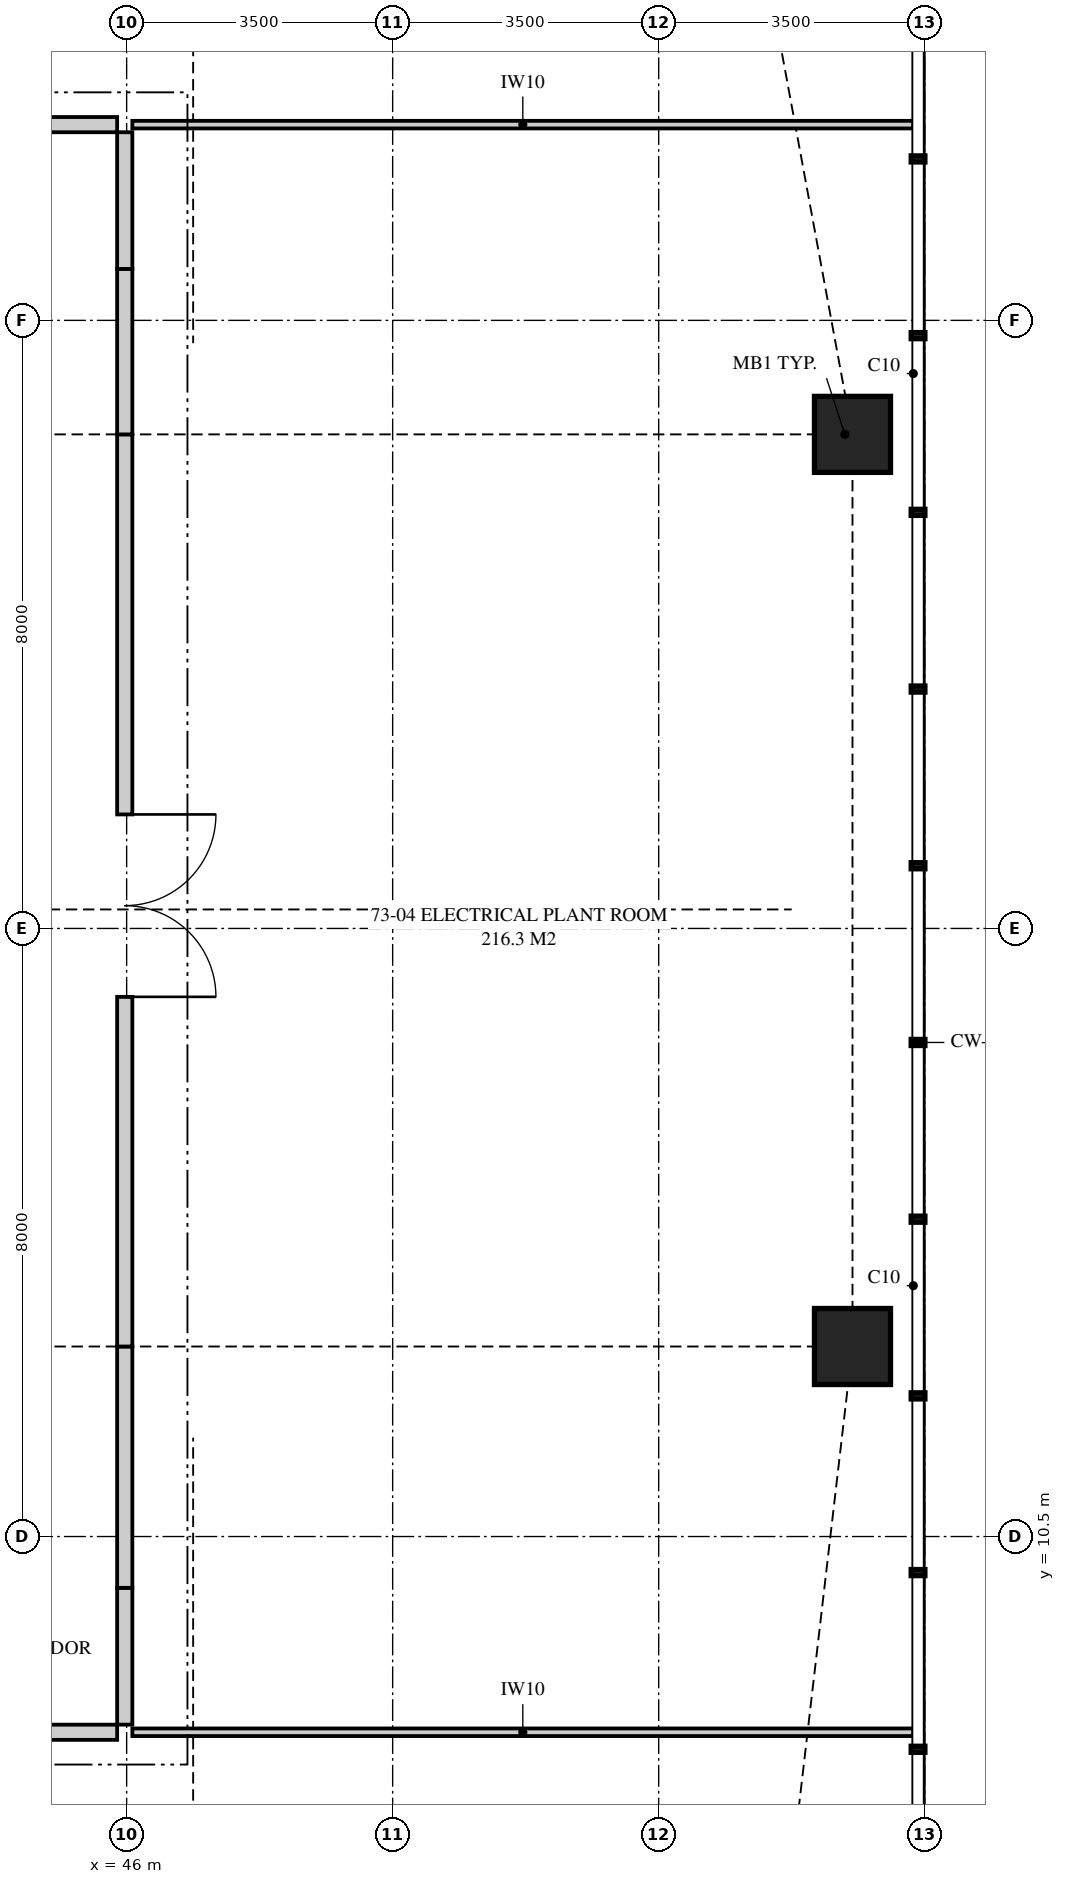
"""IFC4 building model, lengths in metres.
Left out: names, types, materials, properties, quantities, classifications, styles, units other than length and angle.
Written with IfcOpenShell. Run it as: python <this file> out.ifc"""

import sys

from ifc_helpers import new_model, si_unit, direction, frame, frame_2d, origin, origin_2d, place, context, subcontext, project, spatial, polyline, rectangle, outline, extrude, element, fill, save


model = new_model("IFC4")
c1 = context("Model", 3, precision=1e-05, world=origin(), true_north=direction((0.0, 1.0)))
c2 = subcontext(c1, "Body", "Model", "MODEL_VIEW")
j1 = project(units=[si_unit("LENGTHUNIT", "METRE"), si_unit("PLANEANGLEUNIT", "RADIAN")], contexts=[c1])
p1 = place(None, origin())
s1 = spatial("IfcSite", under=j1, at=p1, CompositionType="ELEMENT")
p2 = place(p1, origin())
s2 = spatial("IfcBuilding", under=s1, at=p2, CompositionType="ELEMENT")
p3 = place(p2, frame((0.0, 0.0, 267.75)))
s3 = spatial("IfcBuildingStorey", under=s2, at=p3, CompositionType="ELEMENT", Elevation=267.75)
for number, where, z_axis, x_axis in (
    (1, (55.55, 13.0, 0.0), (0.0, 0.0, 1.0), (1.0, 0.0, 0.0)),
    (2, (55.55, 25.0, 0.0), (0.0, 0.0, 1.0), (1.0, 0.0, 0.0)),
):
    element("IfcColumn", number, at=place(p3, frame(where, z_axis=z_axis, x_axis=x_axis)), inside=s3, PredefinedType="COLUMN", context=c2, shape_type="SweptSolid", body=[
        extrude(rectangle(XDim=1.0, YDim=1.0, at=origin_2d()), origin(), (0.0, 0.0, 1.0), 5.0),
    ])
p4 = place(p3, frame((17.825, 7.925, 0.0), z_axis=(0.0, 0.0, 1.0), x_axis=(1.0, 0.0, 0.0)))
e3 = element("IfcWall", 3, at=p4, inside=s3, PredefinedType="PARTITIONING", context=c2, shape_type="SweptSolid", body=[
    extrude(outline(polyline([(0.0, 0.0), (28.05, 0.0), (28.05, 4.72), (28.05, 4.12), (27.74, 4.12), (27.74, 4.72), (20.735, 4.72), (20.735, 4.12), (18.115, 4.12), (18.115, 4.72), (11.11, 4.72), (11.11, 4.12), (8.49, 4.12), (8.49, 4.72), (3.692, 4.72), (3.692, 4.12), (2.014, 4.12), (2.014, 3.5), (0.147, 3.5), (0.147, 4.72), (0.0, 4.72), (0.0, 0.0)])), frame((0.0, 0.1, 0.0), z_axis=(0.0, -1.0, 0.0), x_axis=(1.0, 0.0, 0.0)), (0.0, 0.0, 1.0), 0.2),
])
p5 = place(p4, frame((13.175, 0.0, 0.0)))
e4 = element("IfcOpeningElement", 4, at=p5, cuts=e3, PredefinedType="OPENING", context=c2, shape_type="SweptSolid", body=[
    extrude(rectangle(XDim=2.4, YDim=2.4, at=frame_2d((1.2, 1.2))), frame((0.0, 0.11, 0.0), z_axis=(0.0, -1.0, 0.0), x_axis=(1.0, 0.0, 0.0)), (0.0, 0.0, 1.0), 0.22),
])
p6 = place(p3, frame((45.975, 8.025, 0.0), z_axis=(0.0, 0.0, 1.0), x_axis=(0.0, 1.0, 0.0)))
e5 = element("IfcWall", 5, at=p6, inside=s3, PredefinedType="PARTITIONING", context=c2, shape_type="SweptSolid", body=[
    extrude(outline(polyline([(0.0, 0.0), (1.8, 0.0), (1.8, 4.72), (1.8, 4.12), (0.0, 4.12), (0.0, 4.72), (0.0, 0.0)])), frame((0.0, 0.1, 0.0), z_axis=(0.0, -1.0, 0.0), x_axis=(1.0, 0.0, 0.0)), (0.0, 0.0, 1.0), 0.2),
])
p7 = place(p3, frame((17.825, 29.075, 0.0), z_axis=(0.0, 0.0, 1.0), x_axis=(1.0, 0.0, 0.0)))
e6 = element("IfcWall", 6, at=p7, inside=s3, PredefinedType="PARTITIONING", context=c2, shape_type="SweptSolid", body=[
    extrude(outline(polyline([(0.0, 0.0), (28.05, 0.0), (28.05, 4.72), (28.05, 4.12), (27.74, 4.12), (27.74, 4.72), (20.735, 4.72), (20.735, 4.12), (18.115, 4.12), (18.115, 4.72), (11.11, 4.72), (11.11, 4.12), (8.49, 4.12), (8.49, 4.72), (3.692, 4.72), (3.692, 4.12), (2.367, 4.12), (2.367, 3.5), (0.431, 3.5), (0.431, 4.72), (0.0, 4.72), (0.0, 0.0)])), frame((0.0, 0.1, 0.0), z_axis=(0.0, -1.0, 0.0), x_axis=(1.0, 0.0, 0.0)), (0.0, 0.0, 1.0), 0.2),
])
p8 = place(p7, frame((13.175, 0.0, 0.0)))
e7 = element("IfcOpeningElement", 7, at=p8, cuts=e6, PredefinedType="OPENING", context=c2, shape_type="SweptSolid", body=[
    extrude(rectangle(XDim=2.4, YDim=2.4, at=frame_2d((1.2, 1.2))), frame((0.0, 0.11, 0.0), z_axis=(0.0, -1.0, 0.0), x_axis=(1.0, 0.0, 0.0)), (0.0, 0.0, 1.0), 0.22),
])
p9 = place(p3, frame((45.975, 27.175, 0.0), z_axis=(0.0, 0.0, 1.0), x_axis=(0.0, 1.0, 0.0)))
e8 = element("IfcWall", 8, at=p9, inside=s3, PredefinedType="PARTITIONING", context=c2, shape_type="SweptSolid", body=[
    extrude(outline(polyline([(0.0, 0.0), (1.8, 0.0), (1.8, 4.72), (1.8, 4.12), (0.0, 4.12), (0.0, 4.72), (0.0, 0.0)])), frame((0.0, 0.1, 0.0), z_axis=(0.0, -1.0, 0.0), x_axis=(1.0, 0.0, 0.0)), (0.0, 0.0, 1.0), 0.2),
])
p10 = place(p3, frame((45.975, 9.825, 0.0), z_axis=(0.0, 0.0, 1.0), x_axis=(0.0, 1.0, 0.0)))
e9 = element("IfcWall", 9, at=p10, inside=s3, PredefinedType="PARTITIONING", context=c2, shape_type="SweptSolid", body=[
    extrude(rectangle(XDim=3.175, YDim=0.2, at=frame_2d((1.587, 0.0))), origin(), (0.0, 0.0, 1.0), 4.12),
])
p11 = place(p3, frame((45.975, 13.0, 0.0), z_axis=(0.0, 0.0, 1.0), x_axis=(0.0, 1.0, 0.0)))
e10 = element("IfcWall", 10, at=p11, inside=s3, PredefinedType="PARTITIONING", context=c2, shape_type="SweptSolid", body=[
    extrude(outline(polyline([(0.0, 0.0), (12.0, 0.0), (12.0, 4.12), (10.69, 4.12), (10.69, 4.72), (7.06, 4.72), (7.06, 4.12), (4.44, 4.12), (4.44, 4.72), (1.31, 4.72), (1.31, 4.12), (0.0, 4.12), (0.0, 0.0)])), frame((0.0, 0.1, 0.0), z_axis=(0.0, -1.0, 0.0), x_axis=(1.0, 0.0, 0.0)), (0.0, 0.0, 1.0), 0.2),
])
p12 = place(p11, frame((4.6, 0.0, 0.0)))
e11 = element("IfcOpeningElement", 11, at=p12, cuts=e10, PredefinedType="OPENING", context=c2, shape_type="SweptSolid", body=[
    extrude(rectangle(XDim=2.4, YDim=2.4, at=frame_2d((1.2, 1.2))), frame((0.0, 0.11, 0.0), z_axis=(0.0, -1.0, 0.0), x_axis=(1.0, 0.0, 0.0)), (0.0, 0.0, 1.0), 0.22),
])
p13 = place(p3, frame((45.975, 25.0, 0.0), z_axis=(0.0, 0.0, 1.0), x_axis=(0.0, 1.0, 0.0)))
e12 = element("IfcWall", 12, at=p13, inside=s3, PredefinedType="PARTITIONING", context=c2, shape_type="SweptSolid", body=[
    extrude(rectangle(XDim=2.175, YDim=0.2, at=frame_2d((1.087, 0.0))), origin(), (0.0, 0.0, 1.0), 4.12),
])
p14 = place(p3, frame((46.075, 7.925, 0.0), z_axis=(0.0, 0.0, 1.0), x_axis=(1.0, 0.0, 0.0)))
e13 = element("IfcWall", 13, at=p14, inside=s3, PredefinedType="PARTITIONING", context=c2, shape_type="SweptSolid", body=[
    extrude(outline(polyline([(0.0, 0.0), (10.275, 0.0), (10.275, 4.72), (9.75, 4.72), (9.75, 3.5), (8.018, 3.5), (8.018, 4.72), (2.06, 4.72), (2.06, 4.12), (0.0, 4.12), (0.0, 4.72), (0.0, 0.0)])), frame((0.0, 0.05, 0.0), z_axis=(0.0, -1.0, 0.0), x_axis=(1.0, 0.0, 0.0)), (0.0, 0.0, 1.0), 0.1),
])
p15 = place(p3, frame((46.075, 29.075, 0.0), z_axis=(0.0, 0.0, 1.0), x_axis=(1.0, 0.0, 0.0)))
e14 = element("IfcWall", 14, at=p15, inside=s3, PredefinedType="PARTITIONING", context=c2, shape_type="SweptSolid", body=[
    extrude(outline(polyline([(0.0, 0.0), (10.275, 0.0), (10.275, 4.72), (9.595, 4.72), (9.595, 3.5), (7.846, 3.5), (7.846, 4.72), (2.06, 4.72), (2.06, 4.12), (0.0, 4.12), (0.0, 4.72), (0.0, 0.0)])), frame((0.0, 0.05, 0.0), z_axis=(0.0, -1.0, 0.0), x_axis=(1.0, 0.0, 0.0)), (0.0, 0.0, 1.0), 0.1),
])
p16 = place(p12, frame((2.4, 0.0, 0.0), z_axis=(0.0, 0.0, 1.0), x_axis=(-1.0, 0.0, 0.0)))
e15 = element("IfcDoor", 15, at=p16, inside=s3, OperationType="DOUBLE_DOOR_SINGLE_SWING", PredefinedType="DOOR", context=c2, shape_type="SweptSolid", body=[
    extrude(rectangle(XDim=2.4, YDim=2.4, at=frame_2d((1.2, 1.2))), frame((0.0, 0.025, 0.0), z_axis=(0.0, -1.0, 0.0), x_axis=(1.0, 0.0, 0.0)), (0.0, 0.0, 1.0), 0.05),
])
fill(e11, e15)
save(model, sys.argv[1])
